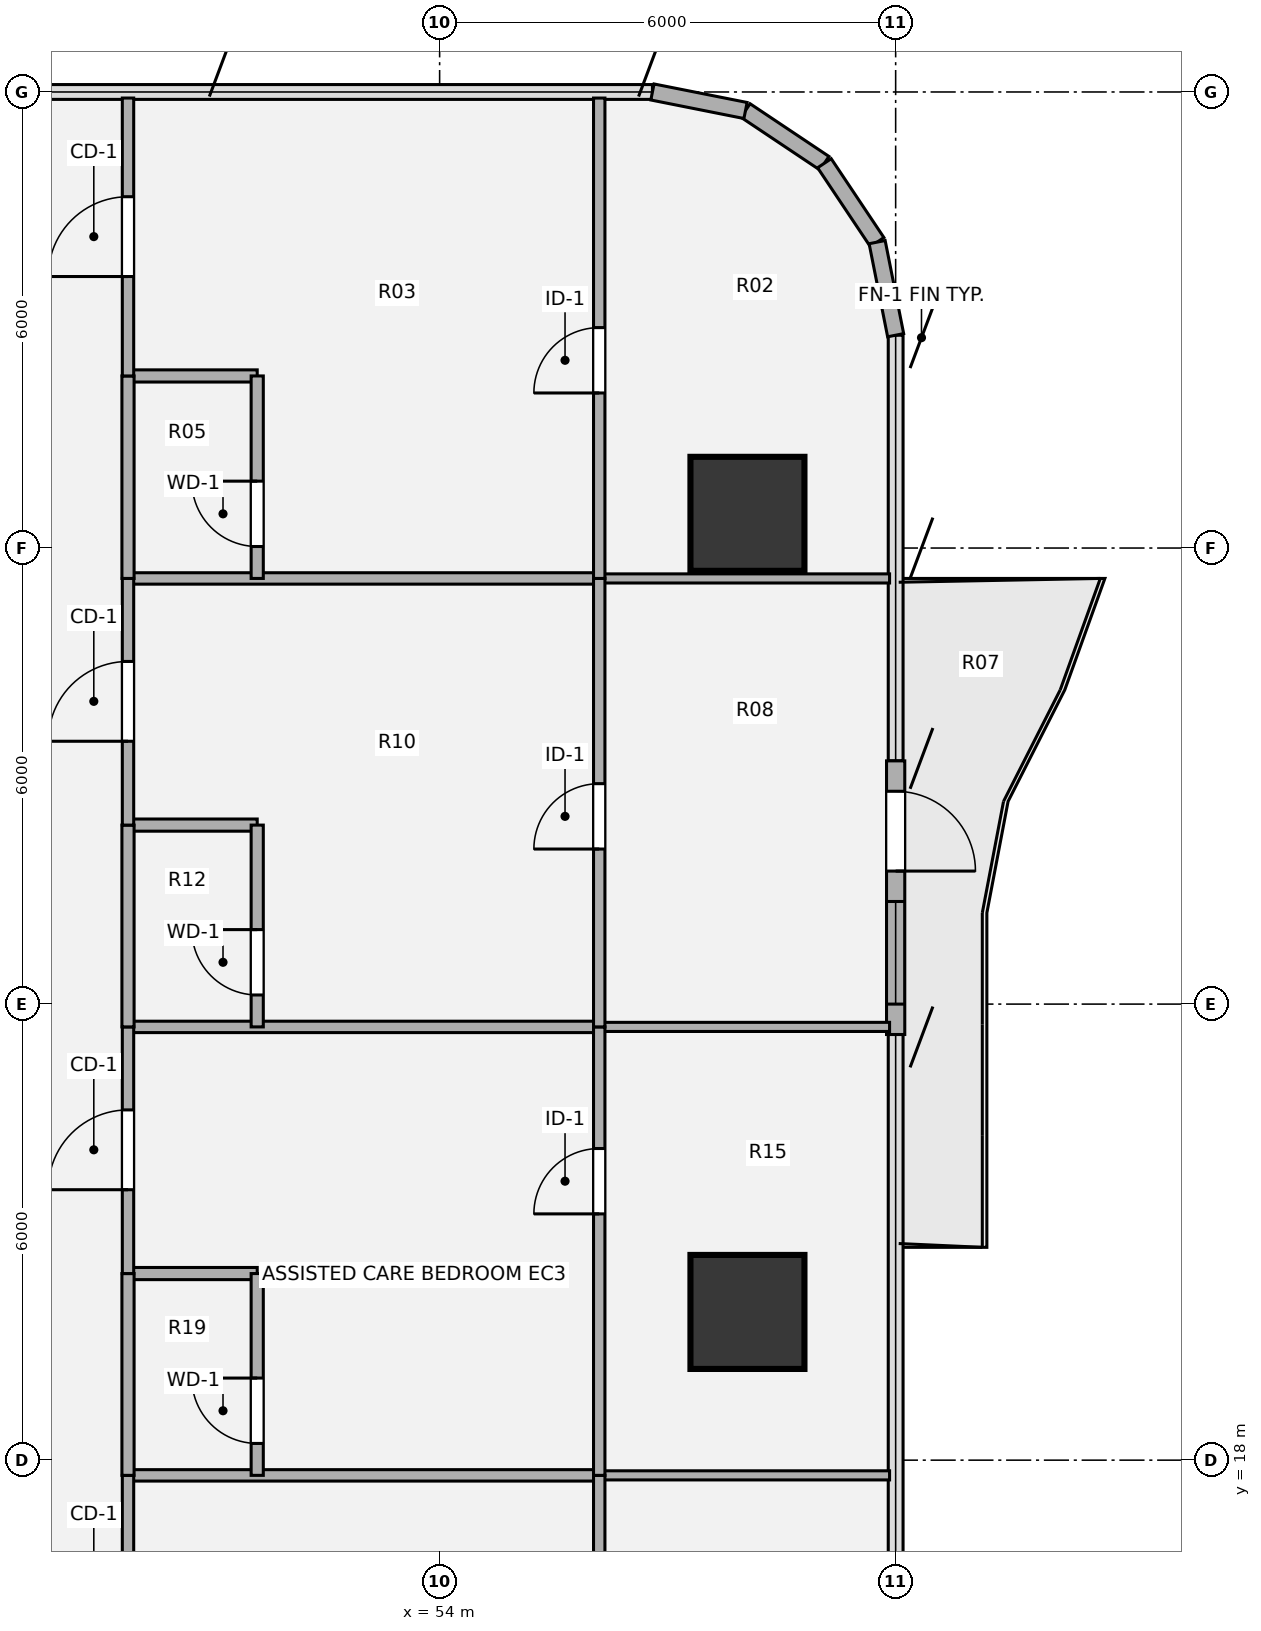
"""IFC4 building model, lengths in metres.
Left out: names, types, materials, properties, quantities, classifications, styles, units other than length and angle.
Written with IfcOpenShell. Run it as: python <this file> out.ifc"""

import sys

from ifc_helpers import new_model, si_unit, direction, frame, frame_2d, origin, origin_2d, place, context, subcontext, project, spatial, rectangle, hollow_circle, extrude, source, transform, mapped, element, fill, save


model = new_model("IFC4")
c1 = context("Model", 3, precision=1e-05, world=origin(), true_north=direction((0.0, 1.0)))
c2 = subcontext(c1, "Body", "Model", "MODEL_VIEW")
j1 = project(units=[si_unit("LENGTHUNIT", "METRE"), si_unit("PLANEANGLEUNIT", "RADIAN")], contexts=[c1])
p1 = place(None, origin())
s1 = spatial("IfcSite", under=j1, at=p1, CompositionType="ELEMENT")
p2 = place(p1, origin())
s2 = spatial("IfcBuilding", under=s1, at=p2, CompositionType="ELEMENT")
p3 = place(p2, frame((0.0, 0.0, 42.12)))
s3 = spatial("IfcBuildingStorey", under=s2, at=p3, CompositionType="ELEMENT", Elevation=42.12)
m1 = source(origin(), c2, "Body", "SweptSolid", [
    extrude(hollow_circle(Radius=0.75, WallThickness=0.05, at=origin_2d()), origin(), (0.0, 0.0, 1.0), 3.78),
])
for number, where, z_axis, x_axis in (
    (1, (58.05, 19.95, 0.0), (0.0, 0.0, 1.0), (1.0, 0.0, 0.0)),
    (2, (58.05, 30.45, 0.0), (0.0, 0.0, 1.0), (1.0, 0.0, 0.0)),
):
    element("IfcColumn", number, at=place(p3, frame(where, z_axis=z_axis, x_axis=x_axis)), inside=s3, PredefinedType="COLUMN", context=c2, shape_type="MappedRepresentation", body=[
        mapped(m1, transform((0.0, 0.0, 0.0), x_axis=(1.0, 0.0, 0.0), y_axis=(0.0, 1.0, 0.0), z_axis=(0.0, 0.0, 1.0), scale=1.0)),
    ])
for number, where, z_axis, x_axis in (
    (3, (58.025, 35.756, 0.0), (0.0, 0.0, 1.0), (0.831, -0.556, 0.0)),
    (4, (59.063, 35.063, 0.0), (0.0, 0.0, 1.0), (0.556, -0.831, 0.0)),
    (5, (59.756, 34.025, 0.0), (0.0, 0.0, 1.0), (0.195, -0.981, 0.0)),
):
    element("IfcWall", number, at=place(p3, frame(where, z_axis=z_axis, x_axis=x_axis)), inside=s3, PredefinedType="SOLIDWALL", context=c2, shape_type="SweptSolid", body=[
        extrude(rectangle(XDim=1.249, YDim=0.215, at=frame_2d((0.624, 0.0))), origin(), (0.0, 0.0, 1.0), 3.53),
    ])
p4 = place(p3, frame((60.0, 27.2, 0.0), z_axis=(0.0, 0.0, 1.0), x_axis=(0.0, -1.0, 0.0)))
e6 = element("IfcWall", 6, at=p4, inside=s3, PredefinedType="SOLIDWALL", context=c2, shape_type="SweptSolid", body=[
    extrude(rectangle(XDim=3.6, YDim=0.24, at=frame_2d((1.8, 0.0))), origin(), (0.0, 0.0, 1.0), 3.53),
])
p5 = place(p4, frame((0.4, 0.0, 0.0)))
e7 = element("IfcOpeningElement", 7, at=p5, cuts=e6, PredefinedType="OPENING", context=c2, shape_type="SweptSolid", body=[
    extrude(rectangle(XDim=1.05, YDim=2.15, at=origin_2d()), frame((0.525, 0.13, 1.075), z_axis=(0.0, -1.0, 0.0), x_axis=(1.0, 0.0, 0.0)), (0.0, 0.0, 1.0), 0.26),
])
p6 = place(p4, frame((1.85, 0.0, 0.85)))
e8 = element("IfcOpeningElement", 8, at=p6, cuts=e6, PredefinedType="OPENING", context=c2, shape_type="SweptSolid", body=[
    extrude(rectangle(XDim=1.35, YDim=1.35, at=origin_2d()), frame((0.675, 0.13, 0.675), z_axis=(0.0, -1.0, 0.0), x_axis=(1.0, 0.0, 0.0)), (0.0, 0.0, 1.0), 0.26),
])
p7 = place(p3, frame((56.8, 36.0, 0.0), z_axis=(0.0, 0.0, 1.0), x_axis=(0.980775717779, -0.195138390419, 0.0)))
e9 = element("IfcWall", 9, at=p7, inside=s3, PredefinedType="SOLIDWALL", context=c2, shape_type="SweptSolid", body=[
    extrude(rectangle(XDim=1.249, YDim=0.215, at=frame_2d((0.624, 0.0))), origin(), (0.0, 0.0, 1.0), 3.53),
])
p8 = place(p3, frame((49.9, 17.8, 0.0), z_axis=(0.0, 0.0, 1.0), x_axis=(1.0, 0.0, 0.0)))
e10 = element("IfcWall", 10, at=p8, inside=s3, PredefinedType="PARTITIONING", context=c2, shape_type="SweptSolid", body=[
    extrude(rectangle(XDim=6.2, YDim=0.15, at=frame_2d((3.1, 0.0))), origin(), (0.0, 0.0, 1.0), 3.5),
])
p9 = place(p3, frame((56.1, 17.8, 0.0), z_axis=(0.0, 0.0, 1.0), x_axis=(1.0, 0.0, 0.0)))
e11 = element("IfcWall", 11, at=p9, inside=s3, PredefinedType="PARTITIONING", context=c2, shape_type="SweptSolid", body=[
    extrude(rectangle(XDim=3.82, YDim=0.12, at=frame_2d((1.91, 0.0))), origin(), (0.0, 0.0, 1.0), 3.5),
])
p10 = place(p3, frame((49.9, 20.455, 0.0), z_axis=(0.0, 0.0, 1.0), x_axis=(1.0, 0.0, 0.0)))
e12 = element("IfcWall", 12, at=p10, inside=s3, PredefinedType="PLUMBINGWALL", context=c2, shape_type="SweptSolid", body=[
    extrude(rectangle(XDim=1.7, YDim=0.16, at=frame_2d((0.85, 0.0))), origin(), (0.0, 0.0, 1.0), 2.982),
])
p11 = place(p3, frame((49.9, 23.7, 0.0), z_axis=(0.0, 0.0, 1.0), x_axis=(1.0, 0.0, 0.0)))
e13 = element("IfcWall", 13, at=p11, inside=s3, PredefinedType="PARTITIONING", context=c2, shape_type="SweptSolid", body=[
    extrude(rectangle(XDim=6.2, YDim=0.15, at=frame_2d((3.1, 0.0))), origin(), (0.0, 0.0, 1.0), 2.982),
])
p12 = place(p3, frame((56.1, 23.7, 0.0), z_axis=(0.0, 0.0, 1.0), x_axis=(1.0, 0.0, 0.0)))
e14 = element("IfcWall", 14, at=p12, inside=s3, PredefinedType="PARTITIONING", context=c2, shape_type="SweptSolid", body=[
    extrude(rectangle(XDim=3.82, YDim=0.12, at=frame_2d((1.91, 0.0))), origin(), (0.0, 0.0, 1.0), 2.982),
])
p13 = place(p3, frame((49.9, 26.355, 0.0), z_axis=(0.0, 0.0, 1.0), x_axis=(1.0, 0.0, 0.0)))
e15 = element("IfcWall", 15, at=p13, inside=s3, PredefinedType="PLUMBINGWALL", context=c2, shape_type="SweptSolid", body=[
    extrude(rectangle(XDim=1.7, YDim=0.16, at=frame_2d((0.85, 0.0))), origin(), (0.0, 0.0, 1.0), 2.982),
])
p14 = place(p3, frame((49.9, 29.6, 0.0), z_axis=(0.0, 0.0, 1.0), x_axis=(1.0, 0.0, 0.0)))
e16 = element("IfcWall", 16, at=p14, inside=s3, PredefinedType="PARTITIONING", context=c2, shape_type="SweptSolid", body=[
    extrude(rectangle(XDim=6.2, YDim=0.15, at=frame_2d((3.1, 0.0))), origin(), (0.0, 0.0, 1.0), 2.982),
])
p15 = place(p3, frame((56.1, 29.6, 0.0), z_axis=(0.0, 0.0, 1.0), x_axis=(1.0, 0.0, 0.0)))
e17 = element("IfcWall", 17, at=p15, inside=s3, PredefinedType="PARTITIONING", context=c2, shape_type="SweptSolid", body=[
    extrude(rectangle(XDim=3.82, YDim=0.12, at=frame_2d((1.91, 0.0))), origin(), (0.0, 0.0, 1.0), 2.982),
])
p16 = place(p3, frame((49.9, 32.264, 0.0), z_axis=(0.0, 0.0, 1.0), x_axis=(1.0, 0.0, 0.0)))
e18 = element("IfcWall", 18, at=p16, inside=s3, PredefinedType="PLUMBINGWALL", context=c2, shape_type="SweptSolid", body=[
    extrude(rectangle(XDim=1.7, YDim=0.16, at=frame_2d((0.85, 0.0))), origin(), (0.0, 0.0, 1.0), 3.5),
])
p17 = place(p3, frame((49.9, 14.555, 0.0), z_axis=(0.0, 0.0, 1.0), x_axis=(0.0, 1.0, 0.0)))
e19 = element("IfcWall", 19, at=p17, inside=s3, PredefinedType="PARTITIONING", context=c2, shape_type="SweptSolid", body=[
    extrude(rectangle(XDim=3.245, YDim=0.15, at=frame_2d((1.623, 0.0))), origin(), (0.0, 0.0, 1.0), 3.5),
])
p18 = place(p17, frame((1.103, 0.0, 0.0)))
e20 = element("IfcOpeningElement", 20, at=p18, cuts=e19, PredefinedType="OPENING", context=c2, shape_type="SweptSolid", body=[
    extrude(rectangle(XDim=1.05, YDim=2.1, at=origin_2d()), frame((0.525, 0.085, 1.05), z_axis=(0.0, -1.0, 0.0), x_axis=(1.0, 0.0, 0.0)), (0.0, 0.0, 1.0), 0.17),
])
p19 = place(p3, frame((49.9, 17.8, 0.0), z_axis=(0.0, 0.0, 1.0), x_axis=(0.0, 1.0, 0.0)))
e21 = element("IfcWall", 21, at=p19, inside=s3, PredefinedType="PLUMBINGWALL", context=c2, shape_type="SweptSolid", body=[
    extrude(rectangle(XDim=2.655, YDim=0.16, at=frame_2d((1.328, 0.0))), origin(), (0.0, 0.0, 1.0), 3.5),
])
p20 = place(p3, frame((49.9, 20.455, 0.0), z_axis=(0.0, 0.0, 1.0), x_axis=(0.0, 1.0, 0.0)))
e22 = element("IfcWall", 22, at=p20, inside=s3, PredefinedType="PARTITIONING", context=c2, shape_type="SweptSolid", body=[
    extrude(rectangle(XDim=3.245, YDim=0.15, at=frame_2d((1.623, 0.0))), origin(), (0.0, 0.0, 1.0), 3.5),
])
p21 = place(p20, frame((1.103, 0.0, 0.0)))
e23 = element("IfcOpeningElement", 23, at=p21, cuts=e22, PredefinedType="OPENING", context=c2, shape_type="SweptSolid", body=[
    extrude(rectangle(XDim=1.05, YDim=2.1, at=origin_2d()), frame((0.525, 0.085, 1.05), z_axis=(0.0, -1.0, 0.0), x_axis=(1.0, 0.0, 0.0)), (0.0, 0.0, 1.0), 0.17),
])
p22 = place(p3, frame((49.9, 23.7, 0.0), z_axis=(0.0, 0.0, 1.0), x_axis=(0.0, 1.0, 0.0)))
e24 = element("IfcWall", 24, at=p22, inside=s3, PredefinedType="PLUMBINGWALL", context=c2, shape_type="SweptSolid", body=[
    extrude(rectangle(XDim=2.655, YDim=0.16, at=frame_2d((1.328, 0.0))), origin(), (0.0, 0.0, 1.0), 3.5),
])
p23 = place(p3, frame((49.9, 26.355, 0.0), z_axis=(0.0, 0.0, 1.0), x_axis=(0.0, 1.0, 0.0)))
e25 = element("IfcWall", 25, at=p23, inside=s3, PredefinedType="PARTITIONING", context=c2, shape_type="SweptSolid", body=[
    extrude(rectangle(XDim=3.245, YDim=0.15, at=frame_2d((1.623, 0.0))), origin(), (0.0, 0.0, 1.0), 3.5),
])
p24 = place(p23, frame((1.103, 0.0, 0.0)))
e26 = element("IfcOpeningElement", 26, at=p24, cuts=e25, PredefinedType="OPENING", context=c2, shape_type="SweptSolid", body=[
    extrude(rectangle(XDim=1.05, YDim=2.1, at=origin_2d()), frame((0.525, 0.085, 1.05), z_axis=(0.0, -1.0, 0.0), x_axis=(1.0, 0.0, 0.0)), (0.0, 0.0, 1.0), 0.17),
])
p25 = place(p3, frame((49.9, 29.6, 0.0), z_axis=(0.0, 0.0, 1.0), x_axis=(0.0, 1.0, 0.0)))
e27 = element("IfcWall", 27, at=p25, inside=s3, PredefinedType="PLUMBINGWALL", context=c2, shape_type="SweptSolid", body=[
    extrude(rectangle(XDim=2.664, YDim=0.16, at=frame_2d((1.332, 0.0))), origin(), (0.0, 0.0, 1.0), 3.5),
])
p26 = place(p3, frame((49.9, 32.264, 0.0), z_axis=(0.0, 0.0, 1.0), x_axis=(0.0, 1.0, 0.0)))
e28 = element("IfcWall", 28, at=p26, inside=s3, PredefinedType="PARTITIONING", context=c2, shape_type="SweptSolid", body=[
    extrude(rectangle(XDim=3.656, YDim=0.15, at=frame_2d((1.828, 0.0))), origin(), (0.0, 0.0, 1.0), 3.5),
])
p27 = place(p26, frame((1.308, 0.0, 0.0)))
e29 = element("IfcOpeningElement", 29, at=p27, cuts=e28, PredefinedType="OPENING", context=c2, shape_type="SweptSolid", body=[
    extrude(rectangle(XDim=1.05, YDim=2.1, at=origin_2d()), frame((0.525, 0.085, 1.05), z_axis=(0.0, -1.0, 0.0), x_axis=(1.0, 0.0, 0.0)), (0.0, 0.0, 1.0), 0.17),
])
p28 = place(p3, frame((51.6, 17.8, 0.0), z_axis=(0.0, 0.0, 1.0), x_axis=(0.0, 1.0, 0.0)))
e30 = element("IfcWall", 30, at=p28, inside=s3, PredefinedType="PLUMBINGWALL", context=c2, shape_type="SweptSolid", body=[
    extrude(rectangle(XDim=2.655, YDim=0.16, at=frame_2d((1.328, 0.0))), origin(), (0.0, 0.0, 1.0), 3.5),
])
p29 = place(p28, frame((0.42, 0.0, 0.0)))
e31 = element("IfcOpeningElement", 31, at=p29, cuts=e30, PredefinedType="OPENING", context=c2, shape_type="SweptSolid", body=[
    extrude(rectangle(XDim=0.86, YDim=2.1, at=origin_2d()), frame((0.43, 0.09, 1.05), z_axis=(0.0, -1.0, 0.0), x_axis=(1.0, 0.0, 0.0)), (0.0, 0.0, 1.0), 0.18),
])
p30 = place(p3, frame((51.6, 23.7, 0.0), z_axis=(0.0, 0.0, 1.0), x_axis=(0.0, 1.0, 0.0)))
e32 = element("IfcWall", 32, at=p30, inside=s3, PredefinedType="PLUMBINGWALL", context=c2, shape_type="SweptSolid", body=[
    extrude(rectangle(XDim=2.655, YDim=0.16, at=frame_2d((1.328, 0.0))), origin(), (0.0, 0.0, 1.0), 3.5),
])
p31 = place(p30, frame((0.42, 0.0, 0.0)))
e33 = element("IfcOpeningElement", 33, at=p31, cuts=e32, PredefinedType="OPENING", context=c2, shape_type="SweptSolid", body=[
    extrude(rectangle(XDim=0.86, YDim=2.1, at=origin_2d()), frame((0.43, 0.09, 1.05), z_axis=(0.0, -1.0, 0.0), x_axis=(1.0, 0.0, 0.0)), (0.0, 0.0, 1.0), 0.18),
])
p32 = place(p3, frame((51.6, 29.6, 0.0), z_axis=(0.0, 0.0, 1.0), x_axis=(0.0, 1.0, 0.0)))
e34 = element("IfcWall", 34, at=p32, inside=s3, PredefinedType="PLUMBINGWALL", context=c2, shape_type="SweptSolid", body=[
    extrude(rectangle(XDim=2.664, YDim=0.16, at=frame_2d((1.332, 0.0))), origin(), (0.0, 0.0, 1.0), 3.5),
])
p33 = place(p32, frame((0.42, 0.0, 0.0)))
e35 = element("IfcOpeningElement", 35, at=p33, cuts=e34, PredefinedType="OPENING", context=c2, shape_type="SweptSolid", body=[
    extrude(rectangle(XDim=0.86, YDim=2.1, at=origin_2d()), frame((0.43, 0.09, 1.05), z_axis=(0.0, -1.0, 0.0), x_axis=(1.0, 0.0, 0.0)), (0.0, 0.0, 1.0), 0.18),
])
p34 = place(p3, frame((56.1, 11.9, 0.0), z_axis=(0.0, 0.0, 1.0), x_axis=(0.0, 1.0, 0.0)))
e36 = element("IfcWall", 36, at=p34, inside=s3, PredefinedType="PARTITIONING", context=c2, shape_type="SweptSolid", body=[
    extrude(rectangle(XDim=5.9, YDim=0.15, at=frame_2d((2.95, 0.0))), origin(), (0.0, 0.0, 1.0), 3.5),
])
p35 = place(p34, frame((2.14, 0.0, 0.0)))
e37 = element("IfcOpeningElement", 37, at=p35, cuts=e36, PredefinedType="OPENING", context=c2, shape_type="SweptSolid", body=[
    extrude(rectangle(XDim=0.86, YDim=2.1, at=origin_2d()), frame((0.43, 0.085, 1.05), z_axis=(0.0, -1.0, 0.0), x_axis=(1.0, 0.0, 0.0)), (0.0, 0.0, 1.0), 0.17),
])
p36 = place(p3, frame((56.1, 17.8, 0.0), z_axis=(0.0, 0.0, 1.0), x_axis=(0.0, 1.0, 0.0)))
e38 = element("IfcWall", 38, at=p36, inside=s3, PredefinedType="PARTITIONING", context=c2, shape_type="SweptSolid", body=[
    extrude(rectangle(XDim=5.9, YDim=0.15, at=frame_2d((2.95, 0.0))), origin(), (0.0, 0.0, 1.0), 3.5),
])
p37 = place(p36, frame((3.44, 0.0, 0.0)))
e39 = element("IfcOpeningElement", 39, at=p37, cuts=e38, PredefinedType="OPENING", context=c2, shape_type="SweptSolid", body=[
    extrude(rectangle(XDim=0.86, YDim=2.1, at=origin_2d()), frame((0.43, 0.085, 1.05), z_axis=(0.0, -1.0, 0.0), x_axis=(1.0, 0.0, 0.0)), (0.0, 0.0, 1.0), 0.17),
])
p38 = place(p3, frame((56.1, 23.7, 0.0), z_axis=(0.0, 0.0, 1.0), x_axis=(0.0, 1.0, 0.0)))
e40 = element("IfcWall", 40, at=p38, inside=s3, PredefinedType="PARTITIONING", context=c2, shape_type="SweptSolid", body=[
    extrude(rectangle(XDim=5.9, YDim=0.15, at=frame_2d((2.95, 0.0))), origin(), (0.0, 0.0, 1.0), 3.5),
])
p39 = place(p38, frame((2.34, 0.0, 0.0)))
e41 = element("IfcOpeningElement", 41, at=p39, cuts=e40, PredefinedType="OPENING", context=c2, shape_type="SweptSolid", body=[
    extrude(rectangle(XDim=0.86, YDim=2.1, at=origin_2d()), frame((0.43, 0.085, 1.05), z_axis=(0.0, -1.0, 0.0), x_axis=(1.0, 0.0, 0.0)), (0.0, 0.0, 1.0), 0.17),
])
p40 = place(p3, frame((56.1, 29.6, 0.0), z_axis=(0.0, 0.0, 1.0), x_axis=(0.0, 1.0, 0.0)))
e42 = element("IfcWall", 42, at=p40, inside=s3, PredefinedType="PARTITIONING", context=c2, shape_type="SweptSolid", body=[
    extrude(rectangle(XDim=6.32, YDim=0.15, at=frame_2d((3.16, 0.0))), origin(), (0.0, 0.0, 1.0), 3.5),
])
p41 = place(p40, frame((2.44, 0.0, 0.0)))
e43 = element("IfcOpeningElement", 43, at=p41, cuts=e42, PredefinedType="OPENING", context=c2, shape_type="SweptSolid", body=[
    extrude(rectangle(XDim=0.86, YDim=2.1, at=origin_2d()), frame((0.43, 0.085, 1.05), z_axis=(0.0, -1.0, 0.0), x_axis=(1.0, 0.0, 0.0)), (0.0, 0.0, 1.0), 0.17),
])
m2 = source(origin(), c2, "Body", "SweptSolid", [
    extrude(rectangle(XDim=1.05, YDim=2.15, at=origin_2d()), frame((0.525, 0.025, 1.075), z_axis=(0.0, -1.0, 0.0), x_axis=(1.0, 0.0, 0.0)), (0.0, 0.0, 1.0), 0.05),
])
p42 = place(p5, origin())
e44 = element("IfcDoor", 44, at=p42, inside=s3, OperationType="SINGLE_SWING_RIGHT", PredefinedType="DOOR", context=c2, shape_type="MappedRepresentation", body=[
    mapped(m2, transform((0.0, 0.0, 0.0), x_axis=(1.0, 0.0, 0.0), y_axis=(0.0, 1.0, 0.0), z_axis=(0.0, 0.0, 1.0), scale=1.0)),
])
fill(e7, e44)
m3 = source(origin(), c2, "Body", "SweptSolid", [
    extrude(rectangle(XDim=1.35, YDim=1.35, at=origin_2d()), frame((0.675, 0.03, 0.675), z_axis=(0.0, -1.0, 0.0), x_axis=(1.0, 0.0, 0.0)), (0.0, 0.0, 1.0), 0.06),
])
p43 = place(p6, origin())
e45 = element("IfcWindow", 45, at=p43, inside=s3, PartitioningType="SINGLE_PANEL", PredefinedType="WINDOW", context=c2, shape_type="MappedRepresentation", body=[
    mapped(m3, transform((0.0, 0.0, 0.0), x_axis=(1.0, 0.0, 0.0), y_axis=(0.0, 1.0, 0.0), z_axis=(0.0, 0.0, 1.0), scale=1.0)),
])
fill(e8, e45)
m4 = source(origin(), c2, "Body", "SweptSolid", [
    extrude(rectangle(XDim=1.05, YDim=2.1, at=origin_2d()), frame((0.525, 0.025, 1.05), z_axis=(0.0, -1.0, 0.0), x_axis=(1.0, 0.0, 0.0)), (0.0, 0.0, 1.0), 0.05),
])
p44 = place(p21, origin())
e46 = element("IfcDoor", 46, at=p44, inside=s3, OperationType="SINGLE_SWING_LEFT", PredefinedType="DOOR", context=c2, shape_type="MappedRepresentation", body=[
    mapped(m4, transform((0.0, 0.0, 0.0), x_axis=(1.0, 0.0, 0.0), y_axis=(0.0, 1.0, 0.0), z_axis=(0.0, 0.0, 1.0), scale=1.0)),
])
fill(e23, e46)
p45 = place(p24, origin())
e47 = element("IfcDoor", 47, at=p45, inside=s3, OperationType="SINGLE_SWING_LEFT", PredefinedType="DOOR", context=c2, shape_type="MappedRepresentation", body=[
    mapped(m4, transform((0.0, 0.0, 0.0), x_axis=(1.0, 0.0, 0.0), y_axis=(0.0, 1.0, 0.0), z_axis=(0.0, 0.0, 1.0), scale=1.0)),
])
fill(e26, e47)
p46 = place(p27, origin())
e48 = element("IfcDoor", 48, at=p46, inside=s3, OperationType="SINGLE_SWING_LEFT", PredefinedType="DOOR", context=c2, shape_type="MappedRepresentation", body=[
    mapped(m4, transform((0.0, 0.0, 0.0), x_axis=(1.0, 0.0, 0.0), y_axis=(0.0, 1.0, 0.0), z_axis=(0.0, 0.0, 1.0), scale=1.0)),
])
fill(e29, e48)
m5 = source(origin(), c2, "Body", "SweptSolid", [
    extrude(rectangle(XDim=0.86, YDim=2.1, at=origin_2d()), frame((0.43, 0.025, 1.05), z_axis=(0.0, -1.0, 0.0), x_axis=(1.0, 0.0, 0.0)), (0.0, 0.0, 1.0), 0.05),
])
p47 = place(p29, origin())
e49 = element("IfcDoor", 49, at=p47, inside=s3, OperationType="SINGLE_SWING_RIGHT", PredefinedType="DOOR", context=c2, shape_type="MappedRepresentation", body=[
    mapped(m5, transform((0.0, 0.0, 0.0), x_axis=(1.0, 0.0, 0.0), y_axis=(0.0, 1.0, 0.0), z_axis=(0.0, 0.0, 1.0), scale=1.0)),
])
fill(e31, e49)
p48 = place(p31, origin())
e50 = element("IfcDoor", 50, at=p48, inside=s3, OperationType="SINGLE_SWING_RIGHT", PredefinedType="DOOR", context=c2, shape_type="MappedRepresentation", body=[
    mapped(m5, transform((0.0, 0.0, 0.0), x_axis=(1.0, 0.0, 0.0), y_axis=(0.0, 1.0, 0.0), z_axis=(0.0, 0.0, 1.0), scale=1.0)),
])
fill(e33, e50)
p49 = place(p33, origin())
e51 = element("IfcDoor", 51, at=p49, inside=s3, OperationType="SINGLE_SWING_RIGHT", PredefinedType="DOOR", context=c2, shape_type="MappedRepresentation", body=[
    mapped(m5, transform((0.0, 0.0, 0.0), x_axis=(1.0, 0.0, 0.0), y_axis=(0.0, 1.0, 0.0), z_axis=(0.0, 0.0, 1.0), scale=1.0)),
])
fill(e35, e51)
m6 = source(origin(), c2, "Body", "SweptSolid", [
    extrude(rectangle(XDim=0.86, YDim=2.1, at=origin_2d()), frame((0.43, 0.025, 1.05), z_axis=(0.0, -1.0, 0.0), x_axis=(1.0, 0.0, 0.0)), (0.0, 0.0, 1.0), 0.05),
])
p50 = place(p37, origin())
e52 = element("IfcDoor", 52, at=p50, inside=s3, OperationType="SINGLE_SWING_LEFT", PredefinedType="DOOR", context=c2, shape_type="MappedRepresentation", body=[
    mapped(m6, transform((0.0, 0.0, 0.0), x_axis=(1.0, 0.0, 0.0), y_axis=(0.0, 1.0, 0.0), z_axis=(0.0, 0.0, 1.0), scale=1.0)),
])
fill(e39, e52)
p51 = place(p39, origin())
e53 = element("IfcDoor", 53, at=p51, inside=s3, OperationType="SINGLE_SWING_LEFT", PredefinedType="DOOR", context=c2, shape_type="MappedRepresentation", body=[
    mapped(m6, transform((0.0, 0.0, 0.0), x_axis=(1.0, 0.0, 0.0), y_axis=(0.0, 1.0, 0.0), z_axis=(0.0, 0.0, 1.0), scale=1.0)),
])
fill(e41, e53)
p52 = place(p41, origin())
e54 = element("IfcDoor", 54, at=p52, inside=s3, OperationType="SINGLE_SWING_LEFT", PredefinedType="DOOR", context=c2, shape_type="MappedRepresentation", body=[
    mapped(m6, transform((0.0, 0.0, 0.0), x_axis=(1.0, 0.0, 0.0), y_axis=(0.0, 1.0, 0.0), z_axis=(0.0, 0.0, 1.0), scale=1.0)),
])
fill(e43, e54)
save(model, sys.argv[1])
